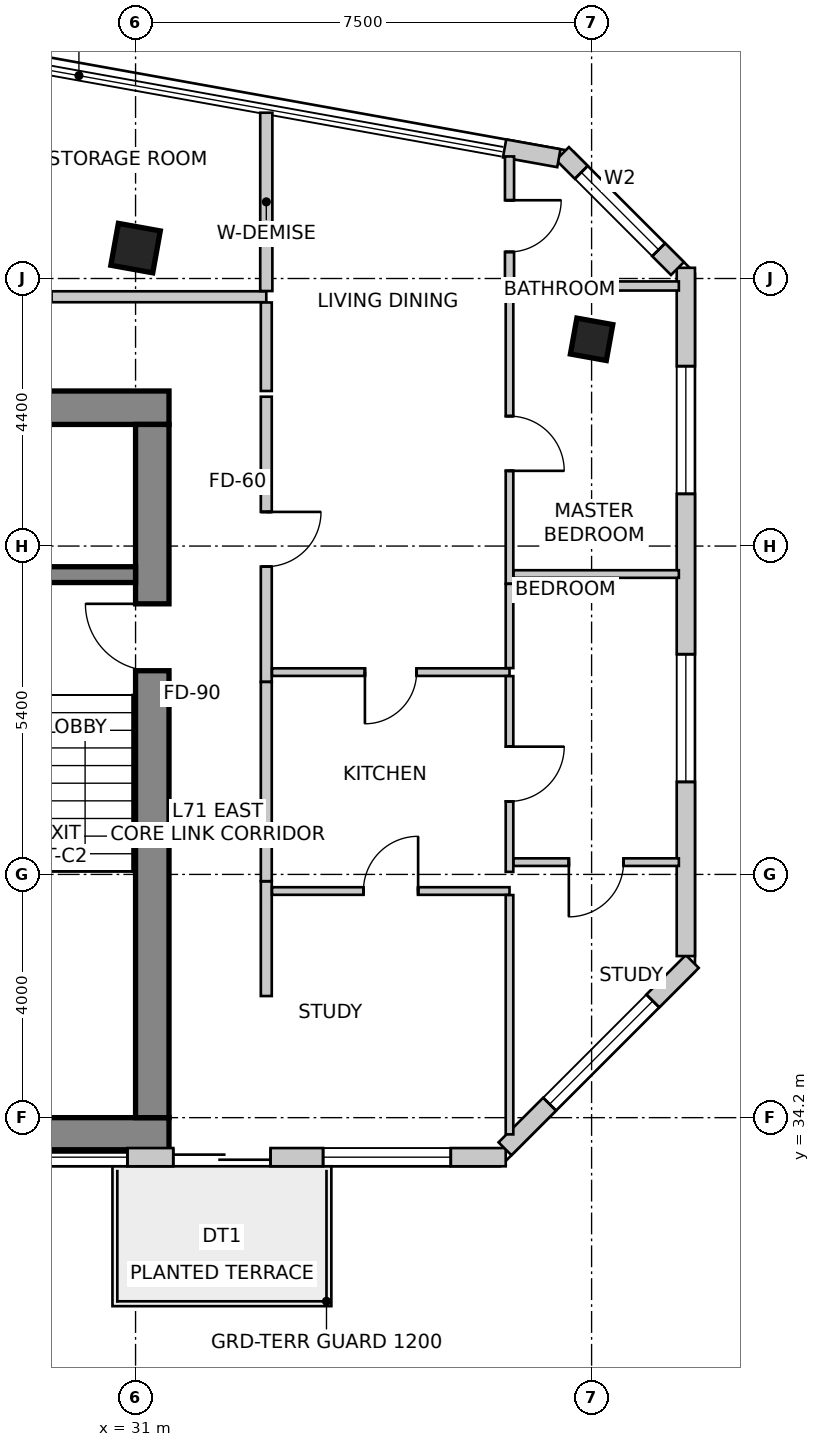
"""IFC4 building model, lengths in metres.
Left out: names, types, materials, properties, quantities, classifications, styles, units other than length and angle.
Written with IfcOpenShell. Run it as: python <this file> out.ifc"""

import sys

from ifc_helpers import new_model, si_unit, direction, frame, frame_2d, origin, origin_2d, place, context, subcontext, project, spatial, rectangle, extrude, source, transform, mapped, element, fill, save


model = new_model("IFC4")
c1 = context("Model", 3, precision=1e-05, world=origin(), true_north=direction((0.0, 1.0)))
c2 = subcontext(c1, "Body", "Model", "MODEL_VIEW")
j1 = project(units=[si_unit("LENGTHUNIT", "METRE"), si_unit("PLANEANGLEUNIT", "RADIAN")], contexts=[c1])
p1 = place(None, origin())
s1 = spatial("IfcSite", under=j1, at=p1, CompositionType="ELEMENT")
p2 = place(p1, origin())
s2 = spatial("IfcBuilding", under=s1, at=p2, CompositionType="ELEMENT")
p3 = place(p2, frame((0.0, 0.0, 278.1)))
s3 = spatial("IfcBuildingStorey", under=s2, at=p3, CompositionType="ELEMENT", Elevation=278.1)
p4 = place(p3, frame((16.05, 45.875, 0.0), z_axis=(0.0, 0.0, 1.0), x_axis=(1.0, 0.0, 0.0)))
e1 = element("IfcWall", 1, at=p4, inside=s3, PredefinedType="SHEAR", context=c2, shape_type="SweptSolid", body=[
    extrude(rectangle(XDim=15.5, YDim=0.55, at=frame_2d((7.75, 0.0))), origin(), (0.0, 0.0, 1.0), 3.6),
])
p5 = place(p3, frame((16.05, 33.925, 0.0), z_axis=(0.0, 0.0, 1.0), x_axis=(1.0, 0.0, 0.0)))
e2 = element("IfcWall", 2, at=p5, inside=s3, PredefinedType="SHEAR", context=c2, shape_type="SweptSolid", body=[
    extrude(rectangle(XDim=15.5, YDim=0.55, at=frame_2d((7.75, 0.0))), origin(), (0.0, 0.0, 1.0), 3.6),
])
m1 = source(origin(), c2, "Body", "SweptSolid", [
    extrude(rectangle(XDim=1.1, YDim=2.15, at=frame_2d((0.55, 1.075))), frame((0.0, 0.285, 0.0), z_axis=(0.0, -1.0, 0.0), x_axis=(1.0, 0.0, 0.0)), (0.0, 0.0, 1.0), 0.57),
])
p6 = place(p5, frame((9.98, 0.0, 0.0)))
e3 = element("IfcOpeningElement", 3, at=p6, cuts=e2, PredefinedType="OPENING", context=c2, shape_type="MappedRepresentation", body=[
    mapped(m1, transform((0.0, 0.0, 0.0), scale=1.0)),
])
p7 = place(p3, frame((31.275, 34.2, 0.0), z_axis=(0.0, 0.0, 1.0), x_axis=(0.0, 1.0, 0.0)))
e4 = element("IfcWall", 4, at=p7, inside=s3, PredefinedType="SHEAR", context=c2, shape_type="SweptSolid", body=[
    extrude(rectangle(XDim=11.4, YDim=0.55, at=frame_2d((5.7, 0.0))), origin(), (0.0, 0.0, 1.0), 3.6),
])
p8 = place(p7, frame((7.35, 0.0, 0.0)))
e5 = element("IfcOpeningElement", 5, at=p8, cuts=e4, PredefinedType="OPENING", context=c2, shape_type="MappedRepresentation", body=[
    mapped(m1, transform((0.0, 0.0, 0.0), scale=1.0)),
])
p9 = place(p3, frame((27.5, 43.13, 0.0), z_axis=(0.0, 0.0, 1.0), x_axis=(1.0, 0.0, 0.0)))
e6 = element("IfcWall", 6, at=p9, inside=s3, PredefinedType="SHEAR", context=c2, shape_type="SweptSolid", body=[
    extrude(rectangle(XDim=3.5, YDim=0.26, at=frame_2d((1.75, 0.0))), origin(), (0.0, 0.0, 1.0), 3.6),
])
m2 = source(origin(), c2, "Body", "SweptSolid", [
    extrude(rectangle(XDim=0.7, YDim=0.7, at=origin_2d()), origin(), (0.0, 0.0, 1.0), 3.6),
])
p10 = place(p3, frame((31.0, 48.5, 0.0), z_axis=(0.0, 0.0, 1.0), x_axis=(0.984195607969, -0.17708474032, 0.0)))
e7 = element("IfcColumn", 7, at=p10, inside=s3, PredefinedType="COLUMN", context=c2, shape_type="MappedRepresentation", body=[
    mapped(m2, transform((0.0, 0.0, 0.0), scale=1.0)),
])
m3 = source(origin(), c2, "Body", "SweptSolid", [
    extrude(rectangle(XDim=0.6, YDim=0.6, at=origin_2d()), origin(), (0.0, 0.0, 1.0), 3.6),
])
p11 = place(p3, frame((38.5, 47.0, 0.0), z_axis=(0.0, 0.0, 1.0), x_axis=(0.984195607969, -0.17708474032, 0.0)))
e8 = element("IfcColumn", 8, at=p11, inside=s3, PredefinedType="COLUMN", context=c2, shape_type="MappedRepresentation", body=[
    mapped(m3, transform((0.0, 0.0, 0.0), scale=1.0)),
])
p12 = place(p3, frame((27.973, 33.55, 0.0), z_axis=(0.0, 0.0, 1.0), x_axis=(1.0, 0.0, 0.0)))
e9 = element("IfcWall", 9, at=p12, inside=s3, PredefinedType="SOLIDWALL", context=c2, shape_type="SweptSolid", body=[
    extrude(rectangle(XDim=9.115, YDim=0.3, at=frame_2d((4.558, 0.0))), origin(), (0.0, 0.0, 1.0), 3.35),
])
m4 = source(origin(), c2, "Body", "SweptSolid", [
    extrude(rectangle(XDim=1.6, YDim=2.15, at=frame_2d((0.8, 1.075))), frame((0.0, 0.16, 0.0), z_axis=(0.0, -1.0, 0.0), x_axis=(1.0, 0.0, 0.0)), (0.0, 0.0, 1.0), 0.32),
])
p13 = place(p12, frame((3.647, 0.0, 0.0)))
e10 = element("IfcOpeningElement", 10, at=p13, cuts=e9, PredefinedType="OPENING", context=c2, shape_type="MappedRepresentation", body=[
    mapped(m4, transform((0.0, 0.0, 0.0), scale=1.0)),
])
m5 = source(origin(), c2, "Body", "SweptSolid", [
    extrude(rectangle(XDim=2.1, YDim=2.0, at=frame_2d((1.05, 1.0))), frame((0.0, 0.16, 0.0), z_axis=(0.0, -1.0, 0.0), x_axis=(1.0, 0.0, 0.0)), (0.0, 0.0, 1.0), 0.32),
])
p14 = place(p12, frame((0.793, 0.0, 0.85)))
e11 = element("IfcOpeningElement", 11, at=p14, cuts=e9, PredefinedType="OPENING", context=c2, shape_type="MappedRepresentation", body=[
    mapped(m5, transform((0.0, 0.0, 0.0), scale=1.0)),
])
p15 = place(p12, frame((6.111, 0.0, 0.85)))
e12 = element("IfcOpeningElement", 12, at=p15, cuts=e9, PredefinedType="OPENING", context=c2, shape_type="MappedRepresentation", body=[
    mapped(m5, transform((0.0, 0.0, 0.0), scale=1.0)),
])
p16 = place(p3, frame((37.076, 33.688, 0.0), z_axis=(0.0, 0.0, 1.0), x_axis=(0.707078757535, 0.707134803727, 0.0)))
e13 = element("IfcWall", 13, at=p16, inside=s3, PredefinedType="SOLIDWALL", context=c2, shape_type="SweptSolid", body=[
    extrude(rectangle(XDim=4.356, YDim=0.3, at=frame_2d((2.178, 0.0))), origin(), (0.0, 0.0, 1.0), 3.35),
])
m6 = source(origin(), c2, "Body", "SweptSolid", [
    extrude(rectangle(XDim=2.4, YDim=2.2, at=frame_2d((1.2, 1.1))), frame((0.0, 0.16, 0.0), z_axis=(0.0, -1.0, 0.0), x_axis=(1.0, 0.0, 0.0)), (0.0, 0.0, 1.0), 0.32),
])
p17 = place(p16, frame((1.038, 0.0, 0.85)))
e14 = element("IfcOpeningElement", 14, at=p17, cuts=e13, PredefinedType="OPENING", context=c2, shape_type="MappedRepresentation", body=[
    mapped(m6, transform((0.0, 0.0, 0.0), scale=1.0)),
])
p18 = place(p3, frame((40.05, 36.857, 0.0), z_axis=(0.0, 0.0, 1.0), x_axis=(0.0, 1.0, 0.0)))
e15 = element("IfcWall", 15, at=p18, inside=s3, PredefinedType="SOLIDWALL", context=c2, shape_type="SweptSolid", body=[
    extrude(rectangle(XDim=11.318, YDim=0.3, at=frame_2d((5.659, 0.0))), origin(), (0.0, 0.0, 1.0), 3.35),
])
p19 = place(p18, frame((2.864, 0.0, 0.85)))
e16 = element("IfcOpeningElement", 16, at=p19, cuts=e15, PredefinedType="OPENING", context=c2, shape_type="MappedRepresentation", body=[
    mapped(m5, transform((0.0, 0.0, 0.0), scale=1.0)),
])
p20 = place(p18, frame((7.601, 0.0, 0.85)))
e17 = element("IfcOpeningElement", 17, at=p20, cuts=e15, PredefinedType="OPENING", context=c2, shape_type="MappedRepresentation", body=[
    mapped(m5, transform((0.0, 0.0, 0.0), scale=1.0)),
])
p21 = place(p3, frame((39.912, 48.164, 0.0), z_axis=(0.0, 0.0, 1.0), x_axis=(-0.70715242601, 0.707061133417, 0.0)))
e18 = element("IfcWall", 18, at=p21, inside=s3, PredefinedType="SOLIDWALL", context=c2, shape_type="SweptSolid", body=[
    extrude(rectangle(XDim=2.674, YDim=0.3, at=frame_2d((1.337, 0.0))), origin(), (0.0, 0.0, 1.0), 3.35),
])
m7 = source(origin(), c2, "Body", "SweptSolid", [
    extrude(rectangle(XDim=1.8, YDim=2.1, at=frame_2d((0.9, 1.05))), frame((0.0, 0.16, 0.0), z_axis=(0.0, -1.0, 0.0), x_axis=(1.0, 0.0, 0.0)), (0.0, 0.0, 1.0), 0.32),
])
p22 = place(p21, frame((0.437, 0.0, 0.85)))
e19 = element("IfcOpeningElement", 19, at=p22, cuts=e18, PredefinedType="OPENING", context=c2, shape_type="MappedRepresentation", body=[
    mapped(m7, transform((0.0, 0.0, 0.0), scale=1.0)),
])
p23 = place(p3, frame((37.962, 49.979, 0.0), z_axis=(0.0, 0.0, 1.0), x_axis=(-0.984233975798, 0.176871368189, 0.0)))
e20 = element("IfcWall", 20, at=p23, inside=s3, PredefinedType="SOLIDWALL", context=c2, shape_type="SweptSolid", body=[
    extrude(rectangle(XDim=0.907, YDim=0.3, at=frame_2d((0.454, 0.0))), origin(), (0.0, 0.0, 1.0), 3.35),
])
p24 = place(p3, frame((28.362, 47.7, 0.0), z_axis=(0.0, 0.0, 1.0), x_axis=(1.0, 0.0, 0.0)))
e21 = element("IfcWall", 21, at=p24, inside=s3, PredefinedType="PARTITIONING", context=c2, shape_type="SweptSolid", body=[
    extrude(rectangle(XDim=4.788, YDim=0.18, at=frame_2d((2.394, 0.0))), origin(), (0.0, 0.0, 1.0), 2.922),
])
m8 = source(origin(), c2, "Body", "SweptSolid", [
    extrude(rectangle(XDim=0.85, YDim=2.15, at=frame_2d((0.425, 1.075))), frame((0.0, 0.1, 0.0), z_axis=(0.0, -1.0, 0.0), x_axis=(1.0, 0.0, 0.0)), (0.0, 0.0, 1.0), 0.2),
])
p25 = place(p24, frame((0.401, 0.0, 0.0)))
e22 = element("IfcOpeningElement", 22, at=p25, cuts=e21, PredefinedType="OPENING", context=c2, shape_type="MappedRepresentation", body=[
    mapped(m8, transform((0.0, 0.0, 0.0), scale=1.0)),
])
p26 = place(p3, frame((33.15, 47.606, 0.0), z_axis=(0.0, 0.0, 1.0), x_axis=(0.0, -1.0, 0.0)))
e23 = element("IfcWall", 23, at=p26, inside=s3, PredefinedType="PARTITIONING", context=c2, shape_type="SweptSolid", body=[
    extrude(rectangle(XDim=1.456, YDim=0.18, at=frame_2d((0.728, 0.0))), origin(), (0.0, 0.0, 1.0), 3.35),
])
p27 = place(p3, frame((33.15, 38.087, 0.0), z_axis=(0.0, 0.0, 1.0), x_axis=(0.0, -1.0, 0.0)))
e24 = element("IfcWall", 24, at=p27, inside=s3, PredefinedType="PARTITIONING", context=c2, shape_type="SweptSolid", body=[
    extrude(rectangle(XDim=1.887, YDim=0.18, at=frame_2d((0.943, 0.0))), origin(), (0.0, 0.0, 1.0), 3.35),
])
p28 = place(p3, frame((33.15, 46.056, 0.0), z_axis=(0.0, 0.0, 1.0), x_axis=(0.0, -1.0, 0.0)))
e25 = element("IfcWall", 25, at=p28, inside=s3, PredefinedType="PARTITIONING", context=c2, shape_type="SweptSolid", body=[
    extrude(rectangle(XDim=4.689, YDim=0.18, at=frame_2d((2.344, 0.0))), origin(), (0.0, 0.0, 1.0), 2.922),
])
m9 = source(origin(), c2, "Body", "SweptSolid", [
    extrude(rectangle(XDim=0.9, YDim=2.15, at=frame_2d((0.45, 1.075))), frame((0.0, 0.1, 0.0), z_axis=(0.0, -1.0, 0.0), x_axis=(1.0, 0.0, 0.0)), (0.0, 0.0, 1.0), 0.2),
])
p29 = place(p28, frame((1.895, 0.0, 0.0)))
e26 = element("IfcOpeningElement", 26, at=p29, cuts=e25, PredefinedType="OPENING", context=c2, shape_type="MappedRepresentation", body=[
    mapped(m9, transform((0.0, 0.0, 0.0), scale=1.0)),
])
p30 = place(p3, frame((33.15, 41.365, 0.0), z_axis=(0.0, 0.0, 1.0), x_axis=(0.0, -1.0, 0.0)))
e27 = element("IfcWall", 27, at=p30, inside=s3, PredefinedType="PARTITIONING", context=c2, shape_type="SweptSolid", body=[
    extrude(rectangle(XDim=3.276, YDim=0.18, at=frame_2d((1.638, 0.0))), origin(), (0.0, 0.0, 1.0), 3.35),
])
p31 = place(p3, frame((33.15, 50.727, 0.0), z_axis=(0.0, 0.0, 1.0), x_axis=(0.0, -1.0, 0.0)))
e28 = element("IfcWall", 28, at=p31, inside=s3, PredefinedType="PARTITIONING", context=c2, shape_type="SweptSolid", body=[
    extrude(rectangle(XDim=2.933, YDim=0.2, at=frame_2d((1.466, 0.0))), origin(), (0.0, 0.0, 1.0), 2.642),
])
p32 = place(p3, frame((33.244, 37.927, 0.0), z_axis=(0.0, 0.0, 1.0), x_axis=(1.0, 0.0, 0.0)))
e29 = element("IfcWall", 29, at=p32, inside=s3, PredefinedType="PARTITIONING", context=c2, shape_type="SweptSolid", body=[
    extrude(rectangle(XDim=3.906, YDim=0.125, at=frame_2d((1.953, 0.0))), origin(), (0.0, 0.0, 1.0), 3.35),
])
m10 = source(origin(), c2, "Body", "SweptSolid", [
    extrude(rectangle(XDim=0.9, YDim=2.15, at=frame_2d((0.45, 1.075))), frame((0.0, 0.073, 0.0), z_axis=(0.0, -1.0, 0.0), x_axis=(1.0, 0.0, 0.0)), (0.0, 0.0, 1.0), 0.145),
])
p33 = place(p32, frame((1.503, 0.0, 0.0)))
e30 = element("IfcOpeningElement", 30, at=p33, cuts=e29, PredefinedType="OPENING", context=c2, shape_type="MappedRepresentation", body=[
    mapped(m10, transform((0.0, 0.0, 0.0), scale=1.0)),
])
p34 = place(p3, frame((37.15, 37.861, 0.0), z_axis=(0.0, 0.0, 1.0), x_axis=(0.0, -1.0, 0.0)))
e31 = element("IfcWall", 31, at=p34, inside=s3, PredefinedType="PARTITIONING", context=c2, shape_type="SweptSolid", body=[
    extrude(rectangle(XDim=3.936, YDim=0.125, at=frame_2d((1.968, 0.0))), origin(), (0.0, 0.0, 1.0), 3.35),
])
p35 = place(p3, frame((37.15, 41.527, 0.0), z_axis=(0.0, 0.0, 1.0), x_axis=(-1.0, 0.0, 0.0)))
e32 = element("IfcWall", 32, at=p35, inside=s3, PredefinedType="PARTITIONING", context=c2, shape_type="SweptSolid", body=[
    extrude(rectangle(XDim=3.906, YDim=0.125, at=frame_2d((1.953, 0.0))), origin(), (0.0, 0.0, 1.0), 3.35),
])
m11 = source(origin(), c2, "Body", "SweptSolid", [
    extrude(rectangle(XDim=0.85, YDim=2.15, at=frame_2d((0.425, 1.075))), frame((0.0, 0.073, 0.0), z_axis=(0.0, -1.0, 0.0), x_axis=(1.0, 0.0, 0.0)), (0.0, 0.0, 1.0), 0.145),
])
p36 = place(p35, frame((1.528, 0.0, 0.0)))
e33 = element("IfcOpeningElement", 33, at=p36, cuts=e32, PredefinedType="OPENING", context=c2, shape_type="MappedRepresentation", body=[
    mapped(m11, transform((0.0, 0.0, 0.0), scale=1.0)),
])
p37 = place(p3, frame((37.15, 50.008, 0.0), z_axis=(0.0, 0.0, 1.0), x_axis=(0.0, -1.0, 0.0)))
e34 = element("IfcWall", 34, at=p37, inside=s3, PredefinedType="PARTITIONING", context=c2, shape_type="SweptSolid", body=[
    extrude(rectangle(XDim=2.291, YDim=0.15, at=frame_2d((1.145, 0.0))), origin(), (0.0, 0.0, 1.0), 3.35),
])
m12 = source(origin(), c2, "Body", "SweptSolid", [
    extrude(rectangle(XDim=0.85, YDim=2.15, at=frame_2d((0.425, 1.075))), frame((0.0, 0.085, 0.0), z_axis=(0.0, -1.0, 0.0), x_axis=(1.0, 0.0, 0.0)), (0.0, 0.0, 1.0), 0.17),
])
p38 = place(p37, frame((0.72, 0.0, 0.0)))
e35 = element("IfcOpeningElement", 35, at=p38, cuts=e34, PredefinedType="OPENING", context=c2, shape_type="MappedRepresentation", body=[
    mapped(m12, transform((0.0, 0.0, 0.0), scale=1.0)),
])
p39 = place(p3, frame((37.15, 47.715, 0.0), z_axis=(0.0, 0.0, 1.0), x_axis=(0.0, -1.0, 0.0)))
e36 = element("IfcWall", 36, at=p39, inside=s3, PredefinedType="PARTITIONING", context=c2, shape_type="SweptSolid", body=[
    extrude(rectangle(XDim=4.735, YDim=0.125, at=frame_2d((2.368, 0.0))), origin(), (0.0, 0.0, 1.0), 2.642),
])
p40 = place(p39, frame((1.978, 0.0, 0.0)))
e37 = element("IfcOpeningElement", 37, at=p40, cuts=e36, PredefinedType="OPENING", context=c2, shape_type="MappedRepresentation", body=[
    mapped(m10, transform((0.0, 0.0, 0.0), scale=1.0)),
])
p41 = place(p3, frame((37.15, 42.978, 0.0), z_axis=(0.0, 0.0, 1.0), x_axis=(0.0, -1.0, 0.0)))
e38 = element("IfcWall", 38, at=p41, inside=s3, PredefinedType="PARTITIONING", context=c2, shape_type="SweptSolid", body=[
    extrude(rectangle(XDim=1.385, YDim=0.125, at=frame_2d((0.692, 0.0))), origin(), (0.0, 0.0, 1.0), 3.35),
])
p42 = place(p3, frame((37.15, 41.46, 0.0), z_axis=(0.0, 0.0, 1.0), x_axis=(0.0, -1.0, 0.0)))
e39 = element("IfcWall", 39, at=p42, inside=s3, PredefinedType="PARTITIONING", context=c2, shape_type="SweptSolid", body=[
    extrude(rectangle(XDim=3.219, YDim=0.125, at=frame_2d((1.609, 0.0))), origin(), (0.0, 0.0, 1.0), 3.35),
])
p43 = place(p42, frame((1.159, 0.0, 0.0)))
e40 = element("IfcOpeningElement", 40, at=p43, cuts=e39, PredefinedType="OPENING", context=c2, shape_type="MappedRepresentation", body=[
    mapped(m10, transform((0.0, 0.0, 0.0), scale=1.0)),
])
p44 = place(p3, frame((39.935, 47.877, 0.0), z_axis=(0.0, 0.0, 1.0), x_axis=(-1.0, 0.0, 0.0)))
e41 = element("IfcWall", 41, at=p44, inside=s3, PredefinedType="PARTITIONING", context=c2, shape_type="SweptSolid", body=[
    extrude(rectangle(XDim=2.706, YDim=0.15, at=frame_2d((1.353, 0.0))), origin(), (0.0, 0.0, 1.0), 3.35),
])
p45 = place(p3, frame((39.935, 43.14, 0.0), z_axis=(0.0, 0.0, 1.0), x_axis=(-1.0, 0.0, 0.0)))
e42 = element("IfcWall", 42, at=p45, inside=s3, PredefinedType="PARTITIONING", context=c2, shape_type="SweptSolid", body=[
    extrude(rectangle(XDim=2.719, YDim=0.125, at=frame_2d((1.359, 0.0))), origin(), (0.0, 0.0, 1.0), 3.35),
])
p46 = place(p3, frame((39.935, 38.402, 0.0), z_axis=(0.0, 0.0, 1.0), x_axis=(-1.0, 0.0, 0.0)))
e43 = element("IfcWall", 43, at=p46, inside=s3, PredefinedType="PARTITIONING", context=c2, shape_type="SweptSolid", body=[
    extrude(rectangle(XDim=2.719, YDim=0.125, at=frame_2d((1.359, 0.0))), origin(), (0.0, 0.0, 1.0), 3.35),
])
p47 = place(p46, frame((0.909, 0.0, 0.0)))
e44 = element("IfcOpeningElement", 44, at=p47, cuts=e43, PredefinedType="OPENING", context=c2, shape_type="MappedRepresentation", body=[
    mapped(m10, transform((0.0, 0.0, 0.0), scale=1.0)),
])
m13 = source(origin(), c2, "Body", "SweptSolid", [
    extrude(rectangle(XDim=1.6, YDim=2.15, at=frame_2d((0.8, 1.075))), frame((0.0, 0.025, 0.0), z_axis=(0.0, -1.0, 0.0), x_axis=(1.0, 0.0, 0.0)), (0.0, 0.0, 1.0), 0.05),
])
p48 = place(p13, origin())
e45 = element("IfcDoor", 45, at=p48, inside=s3, OperationType="DOUBLE_DOOR_SLIDING", PredefinedType="DOOR", context=c2, shape_type="MappedRepresentation", body=[
    mapped(m13, transform((0.0, 0.0, 0.0), scale=1.0)),
])
fill(e10, e45)
m14 = source(origin(), c2, "Body", "SweptSolid", [
    extrude(rectangle(XDim=2.1, YDim=2.0, at=frame_2d((1.05, 1.0))), frame((0.0, -0.015, 0.0), z_axis=(0.0, -1.0, 0.0), x_axis=(1.0, 0.0, 0.0)), (0.0, 0.0, 1.0), 0.06),
])
p49 = place(p14, origin())
e46 = element("IfcWindow", 46, at=p49, inside=s3, PartitioningType="SINGLE_PANEL", PredefinedType="WINDOW", context=c2, shape_type="MappedRepresentation", body=[
    mapped(m14, transform((0.0, 0.0, 0.0), scale=1.0)),
])
fill(e11, e46)
p50 = place(p15, origin())
e47 = element("IfcWindow", 47, at=p50, inside=s3, PartitioningType="SINGLE_PANEL", PredefinedType="WINDOW", context=c2, shape_type="MappedRepresentation", body=[
    mapped(m14, transform((0.0, 0.0, 0.0), scale=1.0)),
])
fill(e12, e47)
m15 = source(origin(), c2, "Body", "SweptSolid", [
    extrude(rectangle(XDim=2.4, YDim=2.2, at=frame_2d((1.2, 1.1))), frame((0.0, -0.015, 0.0), z_axis=(0.0, -1.0, 0.0), x_axis=(1.0, 0.0, 0.0)), (0.0, 0.0, 1.0), 0.06),
])
p51 = place(p17, origin())
e48 = element("IfcWindow", 48, at=p51, inside=s3, PartitioningType="SINGLE_PANEL", PredefinedType="WINDOW", context=c2, shape_type="MappedRepresentation", body=[
    mapped(m15, transform((0.0, 0.0, 0.0), scale=1.0)),
])
fill(e14, e48)
p52 = place(p19, origin())
e49 = element("IfcWindow", 49, at=p52, inside=s3, PartitioningType="SINGLE_PANEL", PredefinedType="WINDOW", context=c2, shape_type="MappedRepresentation", body=[
    mapped(m14, transform((0.0, 0.0, 0.0), scale=1.0)),
])
fill(e16, e49)
p53 = place(p20, origin())
e50 = element("IfcWindow", 50, at=p53, inside=s3, PartitioningType="SINGLE_PANEL", PredefinedType="WINDOW", context=c2, shape_type="MappedRepresentation", body=[
    mapped(m14, transform((0.0, 0.0, 0.0), scale=1.0)),
])
fill(e17, e50)
m16 = source(origin(), c2, "Body", "SweptSolid", [
    extrude(rectangle(XDim=1.8, YDim=2.1, at=frame_2d((0.9, 1.05))), frame((0.0, -0.015, 0.0), z_axis=(0.0, -1.0, 0.0), x_axis=(1.0, 0.0, 0.0)), (0.0, 0.0, 1.0), 0.06),
])
p54 = place(p22, origin())
e51 = element("IfcWindow", 51, at=p54, inside=s3, PartitioningType="SINGLE_PANEL", PredefinedType="WINDOW", context=c2, shape_type="MappedRepresentation", body=[
    mapped(m16, transform((0.0, 0.0, 0.0), scale=1.0)),
])
fill(e19, e51)
m17 = source(origin(), c2, "Body", "SweptSolid", [
    extrude(rectangle(XDim=1.1, YDim=2.15, at=frame_2d((0.55, 1.075))), frame((0.0, 0.025, 0.0), z_axis=(0.0, -1.0, 0.0), x_axis=(1.0, 0.0, 0.0)), (0.0, 0.0, 1.0), 0.05),
])
p55 = place(p8, origin())
e52 = element("IfcDoor", 52, at=p55, inside=s3, OperationType="SINGLE_SWING_RIGHT", PredefinedType="DOOR", context=c2, shape_type="MappedRepresentation", body=[
    mapped(m17, transform((0.0, 0.0, 0.0), scale=1.0)),
])
fill(e5, e52)
m18 = source(origin(), c2, "Body", "SweptSolid", [
    extrude(rectangle(XDim=0.9, YDim=2.15, at=frame_2d((0.45, 1.075))), frame((0.0, 0.025, 0.0), z_axis=(0.0, -1.0, 0.0), x_axis=(1.0, 0.0, 0.0)), (0.0, 0.0, 1.0), 0.05),
])
p56 = place(p33, origin())
e53 = element("IfcDoor", 53, at=p56, inside=s3, OperationType="SINGLE_SWING_RIGHT", PredefinedType="DOOR", context=c2, shape_type="MappedRepresentation", body=[
    mapped(m18, transform((0.0, 0.0, 0.0), scale=1.0)),
])
fill(e30, e53)
m19 = source(origin(), c2, "Body", "SweptSolid", [
    extrude(rectangle(XDim=0.9, YDim=2.15, at=frame_2d((0.45, 1.075))), frame((0.0, 0.025, 0.0), z_axis=(0.0, -1.0, 0.0), x_axis=(1.0, 0.0, 0.0)), (0.0, 0.0, 1.0), 0.05),
])
p57 = place(p29, origin())
e54 = element("IfcDoor", 54, at=p57, inside=s3, OperationType="SINGLE_SWING_LEFT", PredefinedType="DOOR", context=c2, shape_type="MappedRepresentation", body=[
    mapped(m19, transform((0.0, 0.0, 0.0), scale=1.0)),
])
fill(e26, e54)
m20 = source(origin(), c2, "Body", "SweptSolid", [
    extrude(rectangle(XDim=0.85, YDim=2.15, at=frame_2d((0.425, 1.075))), frame((0.0, 0.025, 0.0), z_axis=(0.0, -1.0, 0.0), x_axis=(1.0, 0.0, 0.0)), (0.0, 0.0, 1.0), 0.05),
])
p58 = place(p36, origin())
e55 = element("IfcDoor", 55, at=p58, inside=s3, OperationType="SINGLE_SWING_RIGHT", PredefinedType="DOOR", context=c2, shape_type="MappedRepresentation", body=[
    mapped(m20, transform((0.0, 0.0, 0.0), scale=1.0)),
])
fill(e33, e55)
p59 = place(p38, origin())
e56 = element("IfcDoor", 56, at=p59, inside=s3, OperationType="SINGLE_SWING_LEFT", PredefinedType="DOOR", context=c2, shape_type="MappedRepresentation", body=[
    mapped(m20, transform((0.0, 0.0, 0.0), scale=1.0)),
])
fill(e35, e56)
p60 = place(p40, origin())
e57 = element("IfcDoor", 57, at=p60, inside=s3, OperationType="SINGLE_SWING_RIGHT", PredefinedType="DOOR", context=c2, shape_type="MappedRepresentation", body=[
    mapped(m18, transform((0.0, 0.0, 0.0), scale=1.0)),
])
fill(e37, e57)
p61 = place(p43, origin())
e58 = element("IfcDoor", 58, at=p61, inside=s3, OperationType="SINGLE_SWING_LEFT", PredefinedType="DOOR", context=c2, shape_type="MappedRepresentation", body=[
    mapped(m18, transform((0.0, 0.0, 0.0), scale=1.0)),
])
fill(e40, e58)
p62 = place(p47, origin())
e59 = element("IfcDoor", 59, at=p62, inside=s3, OperationType="SINGLE_SWING_RIGHT", PredefinedType="DOOR", context=c2, shape_type="MappedRepresentation", body=[
    mapped(m18, transform((0.0, 0.0, 0.0), scale=1.0)),
])
fill(e44, e59)
save(model, sys.argv[1])
